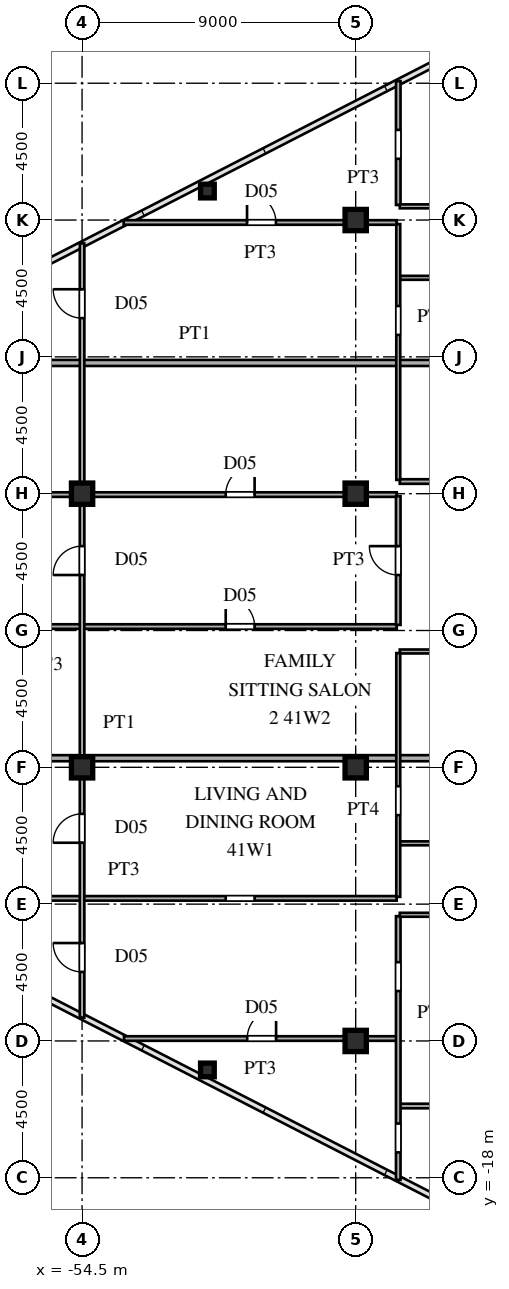
"""IFC4 building model, lengths in metres.
Left out: names, types, materials, properties, quantities, classifications, styles, units other than length and angle.
Written with IfcOpenShell. Run it as: python <this file> out.ifc"""

import sys

from ifc_helpers import new_model, si_unit, direction, frame, frame_2d, origin, origin_2d, place, context, subcontext, project, spatial, rectangle, hollow_rectangle, i_section, extrude, source, transform, mapped, element, fill, save


model = new_model("IFC4")
c1 = context("Model", 3, precision=1e-05, world=origin(), true_north=direction((0.0, 1.0)))
c2 = subcontext(c1, "Body", "Model", "MODEL_VIEW")
j1 = project(units=[si_unit("LENGTHUNIT", "METRE"), si_unit("PLANEANGLEUNIT", "RADIAN")], contexts=[c1])
p1 = place(None, origin())
s1 = spatial("IfcSite", under=j1, at=p1, CompositionType="ELEMENT")
p2 = place(p1, origin())
s2 = spatial("IfcBuilding", under=s1, at=p2, CompositionType="ELEMENT")
p3 = place(p2, frame((0.0, 0.0, 154.8)))
s3 = spatial("IfcBuildingStorey", under=s2, at=p3, CompositionType="ELEMENT", Elevation=154.8)
m1 = source(origin(), c2, "Body", "SweptSolid", [
    extrude(i_section(OverallWidth=0.7, OverallDepth=0.7, WebThickness=0.028, FlangeThickness=0.045, at=origin_2d()), origin(), (0.0, 0.0, 1.0), 3.6),
])
for number, where, z_axis, x_axis in (
    (1, (-45.5, -13.5, 0.0), (0.0, 0.0, 1.0), (1.0, 0.0, 0.0)),
    (2, (-45.5, -4.5, 0.0), (0.0, 0.0, 1.0), (1.0, 0.0, 0.0)),
    (3, (-45.5, 4.5, 0.0), (0.0, 0.0, 1.0), (1.0, 0.0, 0.0)),
    (4, (-45.5, 13.5, 0.0), (0.0, 0.0, 1.0), (1.0, 0.0, 0.0)),
    (5, (-54.5, -4.5, 0.0), (0.0, 0.0, 1.0), (1.0, 0.0, 0.0)),
    (6, (-54.5, 4.5, 0.0), (0.0, 0.0, 1.0), (1.0, 0.0, 0.0)),
):
    element("IfcColumn", number, at=place(p3, frame(where, z_axis=z_axis, x_axis=x_axis)), inside=s3, PredefinedType="COLUMN", context=c2, shape_type="MappedRepresentation", body=[
        mapped(m1, transform((0.0, 0.0, 0.0), scale=1.0)),
    ])
m2 = source(origin(), c2, "Body", "SweptSolid", [
    extrude(hollow_rectangle(XDim=0.45, YDim=0.45, WallThickness=0.018, at=origin_2d()), origin(), (0.0, 0.0, 1.0), 3.6),
])
for number, where, z_axis, x_axis in (
    (7, (-50.377, -14.453, 0.0), (0.0, 0.0, 1.0), (1.0, 0.0, 0.0)),
    (8, (-50.377, 14.453, 0.0), (0.0, 0.0, 1.0), (1.0, 0.0, 0.0)),
):
    element("IfcColumn", number, at=place(p3, frame(where, z_axis=z_axis, x_axis=x_axis)), inside=s3, PredefinedType="COLUMN", context=c2, shape_type="MappedRepresentation", body=[
        mapped(m2, transform((0.0, 0.0, 0.0), scale=1.0)),
    ])
p4 = place(p3, frame((-44.05, -15.64, 0.0), z_axis=(0.0, 0.0, 1.0), x_axis=(1.0, 0.0, 0.0)))
e9 = element("IfcWall", 9, at=p4, inside=s3, PredefinedType="PARTITIONING", context=c2, shape_type="SweptSolid", body=[
    extrude(rectangle(XDim=4.6, YDim=0.15, at=frame_2d((2.3, 0.0))), origin(), (0.0, 0.0, 1.0), 3.38),
])
p5 = place(p3, frame((-53.121, -13.42, 0.0), z_axis=(0.0, 0.0, 1.0), x_axis=(1.0, 0.0, 0.0)))
e10 = element("IfcWall", 10, at=p5, inside=s3, PredefinedType="PARTITIONING", context=c2, shape_type="SweptSolid", body=[
    extrude(rectangle(XDim=3.671, YDim=0.15, at=frame_2d((1.836, 0.0))), origin(), (0.0, 0.0, 1.0), 3.38),
])
p6 = place(p3, frame((-49.45, -13.42, 0.0), z_axis=(0.0, 0.0, 1.0), x_axis=(1.0, 0.0, 0.0)))
e11 = element("IfcWall", 11, at=p6, inside=s3, PredefinedType="PARTITIONING", context=c2, shape_type="SweptSolid", body=[
    extrude(rectangle(XDim=3.985, YDim=0.15, at=frame_2d((1.992, 0.0))), origin(), (0.0, 0.0, 1.0), 2.08),
])
p7 = place(p6, frame((0.382, 0.0, 0.0)))
e12 = element("IfcOpeningElement", 12, at=p7, cuts=e11, PredefinedType="OPENING", context=c2, shape_type="SweptSolid", body=[
    extrude(rectangle(XDim=0.95, YDim=2.03, at=frame_2d((0.475, 1.015))), frame((0.0, 0.085, 0.0), z_axis=(0.0, -1.0, 0.0), x_axis=(1.0, 0.0, 0.0)), (0.0, 0.0, 1.0), 0.17),
])
p8 = place(p3, frame((-45.465, -13.42, 0.0), z_axis=(0.0, 0.0, 1.0), x_axis=(1.0, 0.0, 0.0)))
e13 = element("IfcWall", 13, at=p8, inside=s3, PredefinedType="PARTITIONING", context=c2, shape_type="SweptSolid", body=[
    extrude(rectangle(XDim=1.315, YDim=0.15, at=frame_2d((0.658, 0.0))), origin(), (0.0, 0.0, 1.0), 2.78),
])
p9 = place(p3, frame((-44.05, -9.35, 0.0), z_axis=(0.0, 0.0, 1.0), x_axis=(1.0, 0.0, 0.0)))
e14 = element("IfcWall", 14, at=p9, inside=s3, PredefinedType="PARTITIONING", context=c2, shape_type="SweptSolid", body=[
    extrude(rectangle(XDim=4.6, YDim=0.13, at=frame_2d((2.3, 0.0))), origin(), (0.0, 0.0, 1.0), 3.38),
])
p10 = place(p3, frame((-62.108, -8.81, 0.0), z_axis=(0.0, 0.0, 1.0), x_axis=(1.0, 0.0, 0.0)))
e15 = element("IfcWall", 15, at=p10, inside=s3, PredefinedType="PARTITIONING", context=c2, shape_type="SweptSolid", body=[
    extrude(rectangle(XDim=17.958, YDim=0.15, at=frame_2d((8.979, 0.0))), origin(), (0.0, 0.0, 1.0), 3.38),
])
p11 = place(p10, frame((12.333, 0.0, 0.0)))
e16 = element("IfcOpeningElement", 16, at=p11, cuts=e15, PredefinedType="OPENING", context=c2, shape_type="SweptSolid", body=[
    extrude(rectangle(XDim=0.95, YDim=2.15, at=frame_2d((0.475, 1.075))), frame((0.0, 0.085, 0.0), z_axis=(0.0, -1.0, 0.0), x_axis=(1.0, 0.0, 0.0)), (0.0, 0.0, 1.0), 0.17),
])
p12 = place(p3, frame((-44.05, -7.0, 0.0), z_axis=(0.0, 0.0, 1.0), x_axis=(1.0, 0.0, 0.0)))
e17 = element("IfcWall", 17, at=p12, inside=s3, PredefinedType="PARTITIONING", context=c2, shape_type="SweptSolid", body=[
    extrude(rectangle(XDim=4.6, YDim=0.13, at=frame_2d((2.3, 0.0))), origin(), (0.0, 0.0, 1.0), 3.38),
])
p13 = place(p12, frame((1.86, 0.0, 0.0)))
e18 = element("IfcOpeningElement", 18, at=p13, cuts=e17, PredefinedType="OPENING", context=c2, shape_type="SweptSolid", body=[
    extrude(rectangle(XDim=0.88, YDim=2.1, at=frame_2d((0.44, 1.05))), frame((0.0, 0.075, 0.0), z_axis=(0.0, -1.0, 0.0), x_axis=(1.0, 0.0, 0.0)), (0.0, 0.0, 1.0), 0.15),
])
p14 = place(p3, frame((-69.375, -4.2, 0.0), z_axis=(0.0, 0.0, 1.0), x_axis=(1.0, 0.0, 0.0)))
e19 = element("IfcWall", 19, at=p14, inside=s3, PredefinedType="PARTITIONING", context=c2, shape_type="SweptSolid", body=[
    extrude(rectangle(XDim=29.895, YDim=0.2, at=frame_2d((14.948, 0.0))), origin(), (0.0, 0.0, 1.0), 3.38),
])
p15 = place(p3, frame((-44.05, -0.69, 0.0), z_axis=(0.0, 0.0, 1.0), x_axis=(1.0, 0.0, 0.0)))
e20 = element("IfcWall", 20, at=p15, inside=s3, PredefinedType="PARTITIONING", context=c2, shape_type="SweptSolid", body=[
    extrude(rectangle(XDim=4.6, YDim=0.13, at=frame_2d((2.3, 0.0))), origin(), (0.0, 0.0, 1.0), 3.38),
])
p16 = place(p15, frame((1.86, 0.0, 0.0)))
e21 = element("IfcOpeningElement", 21, at=p16, cuts=e20, PredefinedType="OPENING", context=c2, shape_type="SweptSolid", body=[
    extrude(rectangle(XDim=0.88, YDim=2.1, at=frame_2d((0.44, 1.05))), frame((0.0, 0.075, 0.0), z_axis=(0.0, -1.0, 0.0), x_axis=(1.0, 0.0, 0.0)), (0.0, 0.0, 1.0), 0.15),
])
p17 = place(p3, frame((-69.535, 0.13, 0.0), z_axis=(0.0, 0.0, 1.0), x_axis=(1.0, 0.0, 0.0)))
e22 = element("IfcWall", 22, at=p17, inside=s3, PredefinedType="PARTITIONING", context=c2, shape_type="SweptSolid", body=[
    extrude(rectangle(XDim=25.385, YDim=0.15, at=frame_2d((12.692, 0.0))), origin(), (0.0, 0.0, 1.0), 3.38),
])
p18 = place(p17, frame((19.76, 0.0, 0.0)))
e23 = element("IfcOpeningElement", 23, at=p18, cuts=e22, PredefinedType="OPENING", context=c2, shape_type="SweptSolid", body=[
    extrude(rectangle(XDim=0.95, YDim=2.15, at=frame_2d((0.475, 1.075))), frame((0.0, 0.085, 0.0), z_axis=(0.0, -1.0, 0.0), x_axis=(1.0, 0.0, 0.0)), (0.0, 0.0, 1.0), 0.17),
])
p19 = place(p17, frame((11.71, 0.0, 0.0)))
e24 = element("IfcOpeningElement", 24, at=p19, cuts=e22, PredefinedType="OPENING", context=c2, shape_type="SweptSolid", body=[
    extrude(rectangle(XDim=0.95, YDim=2.15, at=frame_2d((0.475, 1.075))), frame((0.0, 0.085, 0.0), z_axis=(0.0, -1.0, 0.0), x_axis=(1.0, 0.0, 0.0)), (0.0, 0.0, 1.0), 0.17),
])
p20 = place(p3, frame((-69.375, 4.47, 0.0), z_axis=(0.0, 0.0, 1.0), x_axis=(1.0, 0.0, 0.0)))
e25 = element("IfcWall", 25, at=p20, inside=s3, PredefinedType="PARTITIONING", context=c2, shape_type="SweptSolid", body=[
    extrude(rectangle(XDim=25.225, YDim=0.15, at=frame_2d((12.613, 0.0))), origin(), (0.0, 0.0, 1.0), 2.78),
])
p21 = place(p20, frame((19.6, 0.0, 0.0)))
e26 = element("IfcOpeningElement", 26, at=p21, cuts=e25, PredefinedType="OPENING", context=c2, shape_type="SweptSolid", body=[
    extrude(rectangle(XDim=0.95, YDim=2.15, at=frame_2d((0.475, 1.075))), frame((0.0, 0.085, 0.0), z_axis=(0.0, -1.0, 0.0), x_axis=(1.0, 0.0, 0.0)), (0.0, 0.0, 1.0), 0.17),
])
p22 = place(p20, frame((11.55, 0.0, 0.0)))
e27 = element("IfcOpeningElement", 27, at=p22, cuts=e25, PredefinedType="OPENING", context=c2, shape_type="SweptSolid", body=[
    extrude(rectangle(XDim=0.95, YDim=2.15, at=frame_2d((0.475, 1.075))), frame((0.0, 0.085, 0.0), z_axis=(0.0, -1.0, 0.0), x_axis=(1.0, 0.0, 0.0)), (0.0, 0.0, 1.0), 0.17),
])
p23 = place(p3, frame((-44.05, 4.9, 0.0), z_axis=(0.0, 0.0, 1.0), x_axis=(1.0, 0.0, 0.0)))
e28 = element("IfcWall", 28, at=p23, inside=s3, PredefinedType="PARTITIONING", context=c2, shape_type="SweptSolid", body=[
    extrude(rectangle(XDim=4.6, YDim=0.15, at=frame_2d((2.3, 0.0))), origin(), (0.0, 0.0, 1.0), 3.38),
])
p24 = place(p23, frame((1.825, 0.0, 0.0)))
e29 = element("IfcOpeningElement", 29, at=p24, cuts=e28, PredefinedType="OPENING", context=c2, shape_type="SweptSolid", body=[
    extrude(rectangle(XDim=0.95, YDim=2.15, at=frame_2d((0.475, 1.075))), frame((0.0, 0.085, 0.0), z_axis=(0.0, -1.0, 0.0), x_axis=(1.0, 0.0, 0.0)), (0.0, 0.0, 1.0), 0.17),
])
p25 = place(p3, frame((-62.106, 8.8, 0.0), z_axis=(0.0, 0.0, 1.0), x_axis=(1.0, 0.0, 0.0)))
e30 = element("IfcWall", 30, at=p25, inside=s3, PredefinedType="PARTITIONING", context=c2, shape_type="SweptSolid", body=[
    extrude(rectangle(XDim=22.626, YDim=0.2, at=frame_2d((11.313, 0.0))), origin(), (0.0, 0.0, 1.0), 3.38),
])
p26 = place(p3, frame((-44.05, 11.6, 0.0), z_axis=(0.0, 0.0, 1.0), x_axis=(1.0, 0.0, 0.0)))
e31 = element("IfcWall", 31, at=p26, inside=s3, PredefinedType="PARTITIONING", context=c2, shape_type="SweptSolid", body=[
    extrude(rectangle(XDim=4.6, YDim=0.13, at=frame_2d((2.3, 0.0))), origin(), (0.0, 0.0, 1.0), 3.38),
])
p27 = place(p26, frame((1.86, 0.0, 0.0)))
e32 = element("IfcOpeningElement", 32, at=p27, cuts=e31, PredefinedType="OPENING", context=c2, shape_type="SweptSolid", body=[
    extrude(rectangle(XDim=0.88, YDim=2.1, at=frame_2d((0.44, 1.05))), frame((0.0, 0.075, 0.0), z_axis=(0.0, -1.0, 0.0), x_axis=(1.0, 0.0, 0.0)), (0.0, 0.0, 1.0), 0.15),
])
p28 = place(p3, frame((-53.132, 13.42, 0.0), z_axis=(0.0, 0.0, 1.0), x_axis=(1.0, 0.0, 0.0)))
e33 = element("IfcWall", 33, at=p28, inside=s3, PredefinedType="PARTITIONING", context=c2, shape_type="SweptSolid", body=[
    extrude(rectangle(XDim=3.682, YDim=0.15, at=frame_2d((1.841, 0.0))), origin(), (0.0, 0.0, 1.0), 3.38),
])
p29 = place(p3, frame((-49.45, 13.42, 0.0), z_axis=(0.0, 0.0, 1.0), x_axis=(1.0, 0.0, 0.0)))
e34 = element("IfcWall", 34, at=p29, inside=s3, PredefinedType="PARTITIONING", context=c2, shape_type="SweptSolid", body=[
    extrude(rectangle(XDim=3.985, YDim=0.15, at=frame_2d((1.992, 0.0))), origin(), (0.0, 0.0, 1.0), 2.08),
])
p30 = place(p29, frame((0.376, 0.0, 0.0)))
e35 = element("IfcOpeningElement", 35, at=p30, cuts=e34, PredefinedType="OPENING", context=c2, shape_type="SweptSolid", body=[
    extrude(rectangle(XDim=0.95, YDim=2.03, at=frame_2d((0.475, 1.015))), frame((0.0, 0.085, 0.0), z_axis=(0.0, -1.0, 0.0), x_axis=(1.0, 0.0, 0.0)), (0.0, 0.0, 1.0), 0.17),
])
p31 = place(p3, frame((-45.465, 13.42, 0.0), z_axis=(0.0, 0.0, 1.0), x_axis=(1.0, 0.0, 0.0)))
e36 = element("IfcWall", 36, at=p31, inside=s3, PredefinedType="PARTITIONING", context=c2, shape_type="SweptSolid", body=[
    extrude(rectangle(XDim=1.315, YDim=0.15, at=frame_2d((0.658, 0.0))), origin(), (0.0, 0.0, 1.0), 2.78),
])
p32 = place(p3, frame((-44.05, 13.95, 0.0), z_axis=(0.0, 0.0, 1.0), x_axis=(1.0, 0.0, 0.0)))
e37 = element("IfcWall", 37, at=p32, inside=s3, PredefinedType="PARTITIONING", context=c2, shape_type="SweptSolid", body=[
    extrude(rectangle(XDim=4.6, YDim=0.13, at=frame_2d((2.3, 0.0))), origin(), (0.0, 0.0, 1.0), 3.38),
])
p33 = place(p3, frame((-54.5, -12.732, 0.0), z_axis=(0.0, 0.0, 1.0), x_axis=(0.0, 1.0, 0.0)))
e38 = element("IfcWall", 38, at=p33, inside=s3, PredefinedType="PARTITIONING", context=c2, shape_type="SweptSolid", body=[
    extrude(rectangle(XDim=25.464, YDim=0.15, at=frame_2d((12.732, 0.0))), origin(), (0.0, 0.0, 1.0), 2.78),
])
p34 = place(p33, frame((5.751, 0.0, 0.0)))
e39 = element("IfcOpeningElement", 39, at=p34, cuts=e38, PredefinedType="OPENING", context=c2, shape_type="SweptSolid", body=[
    extrude(rectangle(XDim=0.95, YDim=2.15, at=frame_2d((0.475, 1.075))), frame((0.0, 0.085, 0.0), z_axis=(0.0, -1.0, 0.0), x_axis=(1.0, 0.0, 0.0)), (0.0, 0.0, 1.0), 0.17),
])
p35 = place(p33, frame((1.503, 0.0, 0.0)))
e40 = element("IfcOpeningElement", 40, at=p35, cuts=e38, PredefinedType="OPENING", context=c2, shape_type="SweptSolid", body=[
    extrude(rectangle(XDim=0.95, YDim=2.15, at=frame_2d((0.475, 1.075))), frame((0.0, 0.085, 0.0), z_axis=(0.0, -1.0, 0.0), x_axis=(1.0, 0.0, 0.0)), (0.0, 0.0, 1.0), 0.17),
])
p36 = place(p33, frame((14.557, 0.0, 0.0)))
e41 = element("IfcOpeningElement", 41, at=p36, cuts=e38, PredefinedType="OPENING", context=c2, shape_type="SweptSolid", body=[
    extrude(rectangle(XDim=0.95, YDim=2.15, at=frame_2d((0.475, 1.075))), frame((0.0, 0.085, 0.0), z_axis=(0.0, -1.0, 0.0), x_axis=(1.0, 0.0, 0.0)), (0.0, 0.0, 1.0), 0.17),
])
p37 = place(p33, frame((23.006, 0.0, 0.0)))
e42 = element("IfcOpeningElement", 42, at=p37, cuts=e38, PredefinedType="OPENING", context=c2, shape_type="SweptSolid", body=[
    extrude(rectangle(XDim=0.95, YDim=2.15, at=frame_2d((0.475, 1.075))), frame((0.0, 0.085, 0.0), z_axis=(0.0, -1.0, 0.0), x_axis=(1.0, 0.0, 0.0)), (0.0, 0.0, 1.0), 0.17),
])
p38 = place(p3, frame((-44.1, -18.069, 0.0), z_axis=(0.0, 0.0, 1.0), x_axis=(0.0, 1.0, 0.0)))
e43 = element("IfcWall", 43, at=p38, inside=s3, PredefinedType="PARTITIONING", context=c2, shape_type="SweptSolid", body=[
    extrude(rectangle(XDim=8.674, YDim=0.15, at=frame_2d((4.337, 0.0))), origin(), (0.0, 0.0, 1.0), 3.38),
])
p39 = place(p38, frame((6.21, 0.0, 0.0)))
e44 = element("IfcOpeningElement", 44, at=p39, cuts=e43, PredefinedType="OPENING", context=c2, shape_type="SweptSolid", body=[
    extrude(rectangle(XDim=0.95, YDim=2.15, at=frame_2d((0.475, 1.075))), frame((0.0, 0.085, 0.0), z_axis=(0.0, -1.0, 0.0), x_axis=(1.0, 0.0, 0.0)), (0.0, 0.0, 1.0), 0.17),
])
p40 = place(p38, frame((0.904, 0.0, 0.0)))
e45 = element("IfcOpeningElement", 45, at=p40, cuts=e43, PredefinedType="OPENING", context=c2, shape_type="SweptSolid", body=[
    extrude(rectangle(XDim=0.95, YDim=2.15, at=frame_2d((0.475, 1.075))), frame((0.0, 0.085, 0.0), z_axis=(0.0, -1.0, 0.0), x_axis=(1.0, 0.0, 0.0)), (0.0, 0.0, 1.0), 0.17),
])
p41 = place(p3, frame((-44.1, -8.761, 0.0), z_axis=(0.0, 0.0, 1.0), x_axis=(0.0, 1.0, 0.0)))
e46 = element("IfcWall", 46, at=p41, inside=s3, PredefinedType="PARTITIONING", context=c2, shape_type="SweptSolid", body=[
    extrude(rectangle(XDim=8.019, YDim=0.13, at=frame_2d((4.01, 0.0))), origin(), (0.0, 0.0, 1.0), 3.38),
])
p42 = place(p41, frame((2.688, 0.0, 0.0)))
e47 = element("IfcOpeningElement", 47, at=p42, cuts=e46, PredefinedType="OPENING", context=c2, shape_type="SweptSolid", body=[
    extrude(rectangle(XDim=0.95, YDim=2.15, at=frame_2d((0.475, 1.075))), frame((0.0, 0.075, 0.0), z_axis=(0.0, -1.0, 0.0), x_axis=(1.0, 0.0, 0.0)), (0.0, 0.0, 1.0), 0.15),
])
p43 = place(p3, frame((-44.1, 0.183, 0.0), z_axis=(0.0, 0.0, 1.0), x_axis=(0.0, 1.0, 0.0)))
e48 = element("IfcWall", 48, at=p43, inside=s3, PredefinedType="PARTITIONING", context=c2, shape_type="SweptSolid", body=[
    extrude(rectangle(XDim=4.234, YDim=0.15, at=frame_2d((2.117, 0.0))), origin(), (0.0, 0.0, 1.0), 3.38),
])
p44 = place(p43, frame((1.642, 0.0, 0.0)))
e49 = element("IfcOpeningElement", 49, at=p44, cuts=e48, PredefinedType="OPENING", context=c2, shape_type="SweptSolid", body=[
    extrude(rectangle(XDim=0.95, YDim=2.15, at=frame_2d((0.475, 1.075))), frame((0.0, 0.085, 0.0), z_axis=(0.0, -1.0, 0.0), x_axis=(1.0, 0.0, 0.0)), (0.0, 0.0, 1.0), 0.17),
])
p45 = place(p3, frame((-44.1, 4.952, 0.0), z_axis=(0.0, 0.0, 1.0), x_axis=(0.0, 1.0, 0.0)))
e50 = element("IfcWall", 50, at=p45, inside=s3, PredefinedType="PARTITIONING", context=c2, shape_type="SweptSolid", body=[
    extrude(rectangle(XDim=8.415, YDim=0.13, at=frame_2d((4.208, 0.0))), origin(), (0.0, 0.0, 1.0), 3.38),
])
p46 = place(p45, frame((4.771, 0.0, 0.0)))
e51 = element("IfcOpeningElement", 51, at=p46, cuts=e50, PredefinedType="OPENING", context=c2, shape_type="SweptSolid", body=[
    extrude(rectangle(XDim=0.95, YDim=2.15, at=frame_2d((0.475, 1.075))), frame((0.0, 0.075, 0.0), z_axis=(0.0, -1.0, 0.0), x_axis=(1.0, 0.0, 0.0)), (0.0, 0.0, 1.0), 0.15),
])
p47 = place(p3, frame((-44.1, 13.995, 0.0), z_axis=(0.0, 0.0, 1.0), x_axis=(0.0, 1.0, 0.0)))
e52 = element("IfcWall", 52, at=p47, inside=s3, PredefinedType="PARTITIONING", context=c2, shape_type="SweptSolid", body=[
    extrude(rectangle(XDim=4.074, YDim=0.15, at=frame_2d((2.037, 0.0))), origin(), (0.0, 0.0, 1.0), 3.38),
])
p48 = place(p47, frame((1.52, 0.0, 0.0)))
e53 = element("IfcOpeningElement", 53, at=p48, cuts=e52, PredefinedType="OPENING", context=c2, shape_type="SweptSolid", body=[
    extrude(rectangle(XDim=0.95, YDim=2.15, at=frame_2d((0.475, 1.075))), frame((0.0, 0.085, 0.0), z_axis=(0.0, -1.0, 0.0), x_axis=(1.0, 0.0, 0.0)), (0.0, 0.0, 1.0), 0.17),
])
m3 = source(origin(), c2, "Body", "SweptSolid", [
    extrude(rectangle(XDim=0.95, YDim=2.03, at=frame_2d((0.475, 1.015))), frame((0.0, 0.025, 0.0), z_axis=(0.0, -1.0, 0.0), x_axis=(1.0, 0.0, 0.0)), (0.0, 0.0, 1.0), 0.05),
])
p49 = place(p7, origin())
e54 = element("IfcDoor", 54, at=p49, inside=s3, OperationType="SINGLE_SWING_RIGHT", PredefinedType="DOOR", context=c2, shape_type="MappedRepresentation", body=[
    mapped(m3, transform((0.0, 0.0, 0.0), scale=1.0)),
])
fill(e12, e54)
m4 = source(origin(), c2, "Body", "SweptSolid", [
    extrude(rectangle(XDim=0.95, YDim=2.15, at=frame_2d((0.475, 1.075))), frame((0.0, 0.025, 0.0), z_axis=(0.0, -1.0, 0.0), x_axis=(1.0, 0.0, 0.0)), (0.0, 0.0, 1.0), 0.05),
])
p50 = place(p18, origin())
e55 = element("IfcDoor", 55, at=p50, inside=s3, OperationType="SINGLE_SWING_LEFT", PredefinedType="DOOR", context=c2, shape_type="MappedRepresentation", body=[
    mapped(m4, transform((0.0, 0.0, 0.0), scale=1.0)),
])
fill(e23, e55)
p51 = place(p21, origin())
e56 = element("IfcDoor", 56, at=p51, inside=s3, OperationType="SINGLE_SWING_RIGHT", PredefinedType="DOOR", context=c2, shape_type="MappedRepresentation", body=[
    mapped(m4, transform((0.0, 0.0, 0.0), scale=1.0)),
])
fill(e26, e56)
p52 = place(p30, origin())
e57 = element("IfcDoor", 57, at=p52, inside=s3, OperationType="SINGLE_SWING_LEFT", PredefinedType="DOOR", context=c2, shape_type="MappedRepresentation", body=[
    mapped(m3, transform((0.0, 0.0, 0.0), scale=1.0)),
])
fill(e35, e57)
p53 = place(p34, origin())
e58 = element("IfcDoor", 58, at=p53, inside=s3, OperationType="SINGLE_SWING_LEFT", PredefinedType="DOOR", context=c2, shape_type="MappedRepresentation", body=[
    mapped(m4, transform((0.0, 0.0, 0.0), scale=1.0)),
])
fill(e39, e58)
p54 = place(p35, origin())
e59 = element("IfcDoor", 59, at=p54, inside=s3, OperationType="SINGLE_SWING_RIGHT", PredefinedType="DOOR", context=c2, shape_type="MappedRepresentation", body=[
    mapped(m4, transform((0.0, 0.0, 0.0), scale=1.0)),
])
fill(e40, e59)
p55 = place(p36, origin())
e60 = element("IfcDoor", 60, at=p55, inside=s3, OperationType="SINGLE_SWING_LEFT", PredefinedType="DOOR", context=c2, shape_type="MappedRepresentation", body=[
    mapped(m4, transform((0.0, 0.0, 0.0), scale=1.0)),
])
fill(e41, e60)
p56 = place(p37, origin())
e61 = element("IfcDoor", 61, at=p56, inside=s3, OperationType="SINGLE_SWING_RIGHT", PredefinedType="DOOR", context=c2, shape_type="MappedRepresentation", body=[
    mapped(m4, transform((0.0, 0.0, 0.0), scale=1.0)),
])
fill(e42, e61)
p57 = place(p44, origin())
e62 = element("IfcDoor", 62, at=p57, inside=s3, OperationType="SINGLE_SWING_RIGHT", PredefinedType="DOOR", context=c2, shape_type="MappedRepresentation", body=[
    mapped(m4, transform((0.0, 0.0, 0.0), scale=1.0)),
])
fill(e49, e62)
save(model, sys.argv[1])
